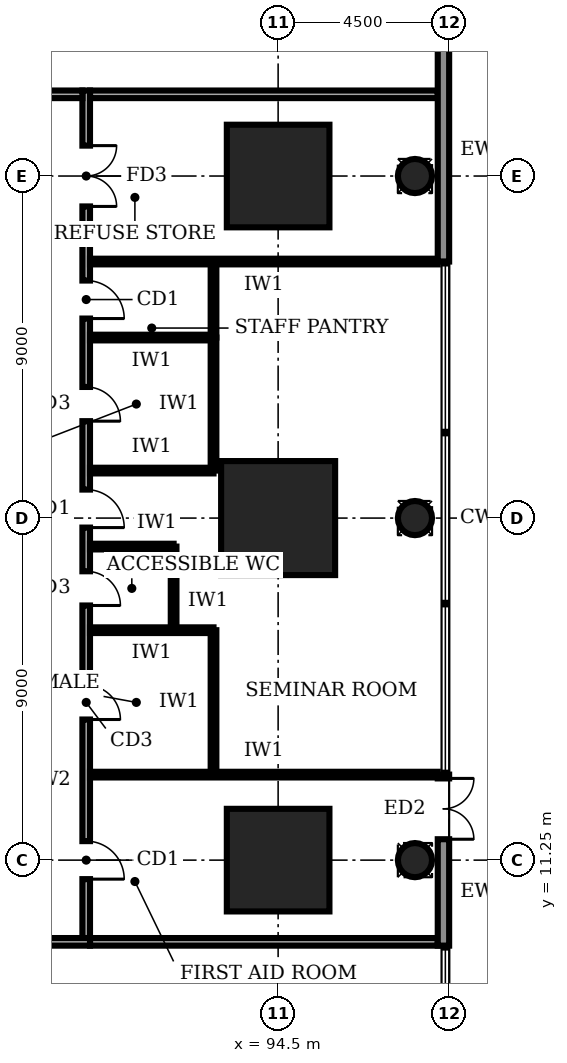
"""IFC4 building model, lengths in metres.
Left out: names, types, materials, properties, quantities, classifications, styles, units other than length and angle.
Written with IfcOpenShell. Run it as: python <this file> out.ifc"""

import sys

from ifc_helpers import new_model, si_unit, direction, frame, frame_2d, origin, origin_2d, place, context, subcontext, project, spatial, rectangle, circle, extrude, element, fill, save


model = new_model("IFC4")
c1 = context("Model", 3, precision=1e-05, world=origin(), true_north=direction((0.0, 1.0)))
c2 = subcontext(c1, "Body", "Model", "MODEL_VIEW")
j1 = project(units=[si_unit("LENGTHUNIT", "METRE"), si_unit("PLANEANGLEUNIT", "RADIAN")], contexts=[c1])
p1 = place(None, origin())
s1 = spatial("IfcSite", under=j1, at=p1, CompositionType="ELEMENT")
p2 = place(p1, origin())
s2 = spatial("IfcBuilding", under=s1, at=p2, CompositionType="ELEMENT")
p3 = place(p2, origin())
s3 = spatial("IfcBuildingStorey", under=s2, at=p3, CompositionType="ELEMENT", Elevation=0.0)
p4 = place(p3, frame((94.5, 11.25, -0.4), z_axis=(0.0, 0.0, 1.0), x_axis=(1.0, 0.0, 0.0)))
e1 = element("IfcColumn", 1, at=p4, inside=s3, PredefinedType="COLUMN", context=c2, shape_type="SweptSolid", body=[
    extrude(rectangle(XDim=2.7, YDim=2.7, at=origin_2d()), origin(), (0.0, 0.0, 1.0), 6.4),
])
p5 = place(p3, frame((94.5, 20.25, -0.4), z_axis=(0.0, 0.0, 1.0), x_axis=(1.0, 0.0, 0.0)))
e2 = element("IfcColumn", 2, at=p5, inside=s3, PredefinedType="COLUMN", context=c2, shape_type="SweptSolid", body=[
    extrude(rectangle(XDim=3.0, YDim=3.0, at=origin_2d()), origin(), (0.0, 0.0, 1.0), 6.4),
])
p6 = place(p3, frame((94.5, 29.25, -0.4), z_axis=(0.0, 0.0, 1.0), x_axis=(1.0, 0.0, 0.0)))
e3 = element("IfcColumn", 3, at=p6, inside=s3, PredefinedType="COLUMN", context=c2, shape_type="SweptSolid", body=[
    extrude(rectangle(XDim=2.7, YDim=2.7, at=origin_2d()), origin(), (0.0, 0.0, 1.0), 6.4),
])
for number, where, z_axis, x_axis in (
    (4, (98.1, 11.25, -0.4), (0.0, 0.0, 1.0), (1.0, 0.0, 0.0)),
    (5, (98.1, 20.25, -0.4), (0.0, 0.0, 1.0), (1.0, 0.0, 0.0)),
    (6, (98.1, 29.25, -0.4), (0.0, 0.0, 1.0), (1.0, 0.0, 0.0)),
):
    element("IfcColumn", number, at=place(p3, frame(where, z_axis=z_axis, x_axis=x_axis)), inside=s3, PredefinedType="COLUMN", context=c2, shape_type="SweptSolid", body=[
        extrude(circle(Radius=0.45, at=origin_2d()), origin(), (0.0, 0.0, 1.0), 6.4),
    ])
p7 = place(p3, frame((98.85, 9.0, 0.0), z_axis=(0.0, 0.0, 1.0), x_axis=(0.0, 1.0, 0.0)))
e7 = element("IfcWall", 7, at=p7, inside=s3, PredefinedType="STANDARD", context=c2, shape_type="SweptSolid", body=[
    extrude(rectangle(XDim=4.5, YDim=0.3, at=frame_2d((2.25, 0.0))), origin(), (0.0, 0.0, 1.0), 5.7),
])
p8 = place(p7, frame((2.8, 0.0, 0.0)))
e8 = element("IfcOpeningElement", 8, at=p8, cuts=e7, PredefinedType="OPENING", context=c2, shape_type="SweptSolid", body=[
    extrude(rectangle(XDim=1.6, YDim=2.4, at=frame_2d((0.8, 1.2))), frame((0.0, 0.16, 0.0), z_axis=(0.0, -1.0, 0.0), x_axis=(1.0, 0.0, 0.0)), (0.0, 0.0, 1.0), 0.32),
])
p9 = place(p3, frame((98.85, 27.0, 0.0), z_axis=(0.0, 0.0, 1.0), x_axis=(0.0, 1.0, 0.0)))
e9 = element("IfcWall", 9, at=p9, inside=s3, PredefinedType="STANDARD", context=c2, shape_type="SweptSolid", body=[
    extrude(rectangle(XDim=9.0, YDim=0.3, at=frame_2d((4.5, 0.0))), origin(), (0.0, 0.0, 1.0), 5.7),
])
p10 = place(p9, frame((5.85, 0.0, 0.0)))
e10 = element("IfcOpeningElement", 10, at=p10, cuts=e9, PredefinedType="OPENING", context=c2, shape_type="SweptSolid", body=[
    extrude(rectangle(XDim=1.8, YDim=2.4, at=frame_2d((0.9, 1.2))), frame((0.0, 0.16, 0.0), z_axis=(0.0, -1.0, 0.0), x_axis=(1.0, 0.0, 0.0)), (0.0, 0.0, 1.0), 0.32),
])
p11 = place(p3, frame((72.65, 9.1, 0.0), z_axis=(0.0, 0.0, 1.0), x_axis=(1.0, 0.0, 0.0)))
e11 = element("IfcWall", 11, at=p11, inside=s3, PredefinedType="SOLIDWALL", context=c2, shape_type="SweptSolid", body=[
    extrude(rectangle(XDim=16.9, YDim=0.2, at=frame_2d((8.45, 0.0))), origin(), (0.0, 0.0, 1.0), 5.7),
])
p12 = place(p11, frame((0.925, 0.0, 0.0)))
e12 = element("IfcOpeningElement", 12, at=p12, cuts=e11, PredefinedType="OPENING", context=c2, shape_type="SweptSolid", body=[
    extrude(rectangle(XDim=1.8, YDim=2.1, at=frame_2d((0.9, 1.05))), frame((0.0, 0.11, 0.0), z_axis=(0.0, -1.0, 0.0), x_axis=(1.0, 0.0, 0.0)), (0.0, 0.0, 1.0), 0.22),
])
p13 = place(p11, frame((7.45, 0.0, 0.0)))
e13 = element("IfcOpeningElement", 13, at=p13, cuts=e11, PredefinedType="OPENING", context=c2, shape_type="SweptSolid", body=[
    extrude(rectangle(XDim=1.8, YDim=2.1, at=frame_2d((0.9, 1.05))), frame((0.0, 0.11, 0.0), z_axis=(0.0, -1.0, 0.0), x_axis=(1.0, 0.0, 0.0)), (0.0, 0.0, 1.0), 0.22),
])
p14 = place(p11, frame((13.975, 0.0, 0.0)))
e14 = element("IfcOpeningElement", 14, at=p14, cuts=e11, PredefinedType="OPENING", context=c2, shape_type="SweptSolid", body=[
    extrude(rectangle(XDim=1.8, YDim=2.1, at=frame_2d((0.9, 1.05))), frame((0.0, 0.11, 0.0), z_axis=(0.0, -1.0, 0.0), x_axis=(1.0, 0.0, 0.0)), (0.0, 0.0, 1.0), 0.22),
])
p15 = place(p3, frame((89.45, 9.2, 0.0), z_axis=(0.0, 0.0, 1.0), x_axis=(0.0, 1.0, 0.0)))
e15 = element("IfcWall", 15, at=p15, inside=s3, PredefinedType="SOLIDWALL", context=c2, shape_type="SweptSolid", body=[
    extrude(rectangle(XDim=22.3, YDim=0.2, at=frame_2d((11.15, 0.0))), origin(), (0.0, 0.0, 1.0), 5.7),
])
p16 = place(p15, frame((1.55, 0.0, 0.0)))
e16 = element("IfcOpeningElement", 16, at=p16, cuts=e15, PredefinedType="OPENING", context=c2, shape_type="SweptSolid", body=[
    extrude(rectangle(XDim=1.0, YDim=2.1, at=frame_2d((0.5, 1.05))), frame((0.0, 0.11, 0.0), z_axis=(0.0, -1.0, 0.0), x_axis=(1.0, 0.0, 0.0)), (0.0, 0.0, 1.0), 0.22),
])
p17 = place(p15, frame((5.75, 0.0, 0.0)))
e17 = element("IfcOpeningElement", 17, at=p17, cuts=e15, PredefinedType="OPENING", context=c2, shape_type="SweptSolid", body=[
    extrude(rectangle(XDim=0.9, YDim=2.1, at=frame_2d((0.45, 1.05))), frame((0.0, 0.11, 0.0), z_axis=(0.0, -1.0, 0.0), x_axis=(1.0, 0.0, 0.0)), (0.0, 0.0, 1.0), 0.22),
])
p18 = place(p15, frame((8.75, 0.0, 0.0)))
e18 = element("IfcOpeningElement", 18, at=p18, cuts=e15, PredefinedType="OPENING", context=c2, shape_type="SweptSolid", body=[
    extrude(rectangle(XDim=0.9, YDim=2.1, at=frame_2d((0.45, 1.05))), frame((0.0, 0.11, 0.0), z_axis=(0.0, -1.0, 0.0), x_axis=(1.0, 0.0, 0.0)), (0.0, 0.0, 1.0), 0.22),
])
p19 = place(p15, frame((13.6, 0.0, 0.0)))
e19 = element("IfcOpeningElement", 19, at=p19, cuts=e15, PredefinedType="OPENING", context=c2, shape_type="SweptSolid", body=[
    extrude(rectangle(XDim=0.9, YDim=2.1, at=frame_2d((0.45, 1.05))), frame((0.0, 0.11, 0.0), z_axis=(0.0, -1.0, 0.0), x_axis=(1.0, 0.0, 0.0)), (0.0, 0.0, 1.0), 0.22),
])
p20 = place(p15, frame((16.3, 0.0, 0.0)))
e20 = element("IfcOpeningElement", 20, at=p20, cuts=e15, PredefinedType="OPENING", context=c2, shape_type="SweptSolid", body=[
    extrude(rectangle(XDim=1.0, YDim=2.1, at=frame_2d((0.5, 1.05))), frame((0.0, 0.11, 0.0), z_axis=(0.0, -1.0, 0.0), x_axis=(1.0, 0.0, 0.0)), (0.0, 0.0, 1.0), 0.22),
])
p21 = place(p15, frame((10.8, 0.0, 0.0)))
e21 = element("IfcOpeningElement", 21, at=p21, cuts=e15, PredefinedType="OPENING", context=c2, shape_type="SweptSolid", body=[
    extrude(rectangle(XDim=1.0, YDim=2.1, at=frame_2d((0.5, 1.05))), frame((0.0, 0.11, 0.0), z_axis=(0.0, -1.0, 0.0), x_axis=(1.0, 0.0, 0.0)), (0.0, 0.0, 1.0), 0.22),
])
p22 = place(p15, frame((19.25, 0.0, 0.0)))
e22 = element("IfcOpeningElement", 22, at=p22, cuts=e15, PredefinedType="OPENING", context=c2, shape_type="SweptSolid", body=[
    extrude(rectangle(XDim=1.6, YDim=2.1, at=frame_2d((0.8, 1.05))), frame((0.0, 0.11, 0.0), z_axis=(0.0, -1.0, 0.0), x_axis=(1.0, 0.0, 0.0)), (0.0, 0.0, 1.0), 0.22),
])
p23 = place(p3, frame((89.35, 31.4, 0.0), z_axis=(0.0, 0.0, 1.0), x_axis=(-1.0, 0.0, 0.0)))
e23 = element("IfcWall", 23, at=p23, inside=s3, PredefinedType="SOLIDWALL", context=c2, shape_type="SweptSolid", body=[
    extrude(rectangle(XDim=16.9, YDim=0.2, at=frame_2d((8.45, 0.0))), origin(), (0.0, 0.0, 1.0), 5.7),
])
p24 = place(p23, frame((13.975, 0.0, 0.0)))
e24 = element("IfcOpeningElement", 24, at=p24, cuts=e23, PredefinedType="OPENING", context=c2, shape_type="SweptSolid", body=[
    extrude(rectangle(XDim=1.8, YDim=2.1, at=frame_2d((0.9, 1.05))), frame((0.0, 0.11, 0.0), z_axis=(0.0, -1.0, 0.0), x_axis=(1.0, 0.0, 0.0)), (0.0, 0.0, 1.0), 0.22),
])
p25 = place(p23, frame((7.85, 0.0, 0.0)))
e25 = element("IfcOpeningElement", 25, at=p25, cuts=e23, PredefinedType="OPENING", context=c2, shape_type="SweptSolid", body=[
    extrude(rectangle(XDim=1.0, YDim=2.1, at=frame_2d((0.5, 1.05))), frame((0.0, 0.11, 0.0), z_axis=(0.0, -1.0, 0.0), x_axis=(1.0, 0.0, 0.0)), (0.0, 0.0, 1.0), 0.22),
])
p26 = place(p23, frame((0.925, 0.0, 0.0)))
e26 = element("IfcOpeningElement", 26, at=p26, cuts=e23, PredefinedType="OPENING", context=c2, shape_type="SweptSolid", body=[
    extrude(rectangle(XDim=1.8, YDim=2.1, at=frame_2d((0.9, 1.05))), frame((0.0, 0.11, 0.0), z_axis=(0.0, -1.0, 0.0), x_axis=(1.0, 0.0, 0.0)), (0.0, 0.0, 1.0), 0.22),
])
for number, where, z_axis, x_axis in (
    (27, (89.55, 9.1, 0.0), (0.0, 0.0, 1.0), (1.0, 0.0, 0.0)),
    (28, (89.55, 31.4, 0.0), (0.0, 0.0, 1.0), (1.0, 0.0, 0.0)),
):
    element("IfcWall", number, at=place(p3, frame(where, z_axis=z_axis, x_axis=x_axis)), inside=s3, PredefinedType="SOLIDWALL", context=c2, shape_type="SweptSolid", body=[
        extrude(rectangle(XDim=9.15, YDim=0.2, at=frame_2d((4.575, 0.0))), origin(), (0.0, 0.0, 1.0), 5.7),
    ])
for number, where, z_axis, x_axis in (
    (29, (89.55, 13.5, 0.0), (0.0, 0.0, 1.0), (1.0, 0.0, 0.0)),
    (30, (89.55, 27.0, 0.0), (0.0, 0.0, 1.0), (1.0, 0.0, 0.0)),
):
    element("IfcWall", number, at=place(p3, frame(where, z_axis=z_axis, x_axis=x_axis)), inside=s3, PredefinedType="PARTITIONING", context=c2, shape_type="SweptSolid", body=[
        extrude(rectangle(XDim=9.15, YDim=0.15, at=frame_2d((4.575, 0.0))), origin(), (0.0, 0.0, 1.0), 5.7),
    ])
p27 = place(p3, frame((89.55, 17.3, 0.0), z_axis=(0.0, 0.0, 1.0), x_axis=(1.0, 0.0, 0.0)))
e31 = element("IfcWall", 31, at=p27, inside=s3, PredefinedType="PARTITIONING", context=c2, shape_type="SweptSolid", body=[
    extrude(rectangle(XDim=3.25, YDim=0.15, at=frame_2d((1.625, 0.0))), origin(), (0.0, 0.0, 1.0), 5.7),
])
p28 = place(p3, frame((89.55, 19.5, 0.0), z_axis=(0.0, 0.0, 1.0), x_axis=(1.0, 0.0, 0.0)))
e32 = element("IfcWall", 32, at=p28, inside=s3, PredefinedType="PARTITIONING", context=c2, shape_type="SweptSolid", body=[
    extrude(rectangle(XDim=2.2, YDim=0.15, at=frame_2d((1.1, 0.0))), origin(), (0.0, 0.0, 1.0), 5.7),
])
for number, where, z_axis, x_axis in (
    (33, (89.55, 21.5, 0.0), (0.0, 0.0, 1.0), (1.0, 0.0, 0.0)),
    (34, (89.55, 25.0, 0.0), (0.0, 0.0, 1.0), (1.0, 0.0, 0.0)),
):
    element("IfcWall", number, at=place(p3, frame(where, z_axis=z_axis, x_axis=x_axis)), inside=s3, PredefinedType="PARTITIONING", context=c2, shape_type="SweptSolid", body=[
        extrude(rectangle(XDim=3.25, YDim=0.15, at=frame_2d((1.625, 0.0))), origin(), (0.0, 0.0, 1.0), 5.7),
    ])
p29 = place(p3, frame((92.8, 13.5, 0.0), z_axis=(0.0, 0.0, 1.0), x_axis=(0.0, 1.0, 0.0)))
e35 = element("IfcWall", 35, at=p29, inside=s3, PredefinedType="PARTITIONING", context=c2, shape_type="SweptSolid", body=[
    extrude(rectangle(XDim=3.8, YDim=0.15, at=frame_2d((1.9, 0.0))), origin(), (0.0, 0.0, 1.0), 5.7),
])
p30 = place(p3, frame((91.75, 17.3, 0.0), z_axis=(0.0, 0.0, 1.0), x_axis=(0.0, 1.0, 0.0)))
e36 = element("IfcWall", 36, at=p30, inside=s3, PredefinedType="PARTITIONING", context=c2, shape_type="SweptSolid", body=[
    extrude(rectangle(XDim=2.2, YDim=0.15, at=frame_2d((1.1, 0.0))), origin(), (0.0, 0.0, 1.0), 5.7),
])
p31 = place(p3, frame((92.8, 21.5, 0.0), z_axis=(0.0, 0.0, 1.0), x_axis=(0.0, 1.0, 0.0)))
e37 = element("IfcWall", 37, at=p31, inside=s3, PredefinedType="PARTITIONING", context=c2, shape_type="SweptSolid", body=[
    extrude(rectangle(XDim=3.5, YDim=0.15, at=frame_2d((1.75, 0.0))), origin(), (0.0, 0.0, 1.0), 5.7),
])
p32 = place(p3, frame((92.8, 25.0, 0.0), z_axis=(0.0, 0.0, 1.0), x_axis=(0.0, 1.0, 0.0)))
e38 = element("IfcWall", 38, at=p32, inside=s3, PredefinedType="PARTITIONING", context=c2, shape_type="SweptSolid", body=[
    extrude(rectangle(XDim=2.0, YDim=0.15, at=frame_2d((1.0, 0.0))), origin(), (0.0, 0.0, 1.0), 5.7),
])
p33 = place(p8, frame((1.6, 0.0, 0.0), z_axis=(0.0, 0.0, 1.0), x_axis=(-1.0, 0.0, 0.0)))
e39 = element("IfcDoor", 39, at=p33, inside=s3, OperationType="DOUBLE_DOOR_SINGLE_SWING", PredefinedType="DOOR", context=c2, shape_type="SweptSolid", body=[
    extrude(rectangle(XDim=1.6, YDim=2.4, at=frame_2d((0.8, 1.2))), frame((0.0, 0.025, 0.0), z_axis=(0.0, -1.0, 0.0), x_axis=(1.0, 0.0, 0.0)), (0.0, 0.0, 1.0), 0.05),
])
fill(e8, e39)
p34 = place(p16, frame((1.0, 0.0, 0.0), z_axis=(0.0, 0.0, 1.0), x_axis=(-1.0, 0.0, 0.0)))
e40 = element("IfcDoor", 40, at=p34, inside=s3, OperationType="SINGLE_SWING_RIGHT", PredefinedType="DOOR", context=c2, shape_type="SweptSolid", body=[
    extrude(rectangle(XDim=1.0, YDim=2.1, at=frame_2d((0.5, 1.05))), frame((0.0, 0.025, 0.0), z_axis=(0.0, -1.0, 0.0), x_axis=(1.0, 0.0, 0.0)), (0.0, 0.0, 1.0), 0.05),
])
fill(e16, e40)
p35 = place(p17, frame((0.9, 0.0, 0.0), z_axis=(0.0, 0.0, 1.0), x_axis=(-1.0, 0.0, 0.0)))
e41 = element("IfcDoor", 41, at=p35, inside=s3, OperationType="SINGLE_SWING_RIGHT", PredefinedType="DOOR", context=c2, shape_type="SweptSolid", body=[
    extrude(rectangle(XDim=0.9, YDim=2.1, at=frame_2d((0.45, 1.05))), frame((0.0, 0.025, 0.0), z_axis=(0.0, -1.0, 0.0), x_axis=(1.0, 0.0, 0.0)), (0.0, 0.0, 1.0), 0.05),
])
fill(e17, e41)
p36 = place(p18, frame((0.9, 0.0, 0.0), z_axis=(0.0, 0.0, 1.0), x_axis=(-1.0, 0.0, 0.0)))
e42 = element("IfcDoor", 42, at=p36, inside=s3, OperationType="SINGLE_SWING_RIGHT", PredefinedType="DOOR", context=c2, shape_type="SweptSolid", body=[
    extrude(rectangle(XDim=0.9, YDim=2.1, at=frame_2d((0.45, 1.05))), frame((0.0, 0.025, 0.0), z_axis=(0.0, -1.0, 0.0), x_axis=(1.0, 0.0, 0.0)), (0.0, 0.0, 1.0), 0.05),
])
fill(e18, e42)
p37 = place(p19, frame((0.9, 0.0, 0.0), z_axis=(0.0, 0.0, 1.0), x_axis=(-1.0, 0.0, 0.0)))
e43 = element("IfcDoor", 43, at=p37, inside=s3, OperationType="SINGLE_SWING_RIGHT", PredefinedType="DOOR", context=c2, shape_type="SweptSolid", body=[
    extrude(rectangle(XDim=0.9, YDim=2.1, at=frame_2d((0.45, 1.05))), frame((0.0, 0.025, 0.0), z_axis=(0.0, -1.0, 0.0), x_axis=(1.0, 0.0, 0.0)), (0.0, 0.0, 1.0), 0.05),
])
fill(e19, e43)
p38 = place(p20, frame((1.0, 0.0, 0.0), z_axis=(0.0, 0.0, 1.0), x_axis=(-1.0, 0.0, 0.0)))
e44 = element("IfcDoor", 44, at=p38, inside=s3, OperationType="SINGLE_SWING_RIGHT", PredefinedType="DOOR", context=c2, shape_type="SweptSolid", body=[
    extrude(rectangle(XDim=1.0, YDim=2.1, at=frame_2d((0.5, 1.05))), frame((0.0, 0.025, 0.0), z_axis=(0.0, -1.0, 0.0), x_axis=(1.0, 0.0, 0.0)), (0.0, 0.0, 1.0), 0.05),
])
fill(e20, e44)
p39 = place(p21, frame((1.0, 0.0, 0.0), z_axis=(0.0, 0.0, 1.0), x_axis=(-1.0, 0.0, 0.0)))
e45 = element("IfcDoor", 45, at=p39, inside=s3, OperationType="SINGLE_SWING_RIGHT", PredefinedType="DOOR", context=c2, shape_type="SweptSolid", body=[
    extrude(rectangle(XDim=1.0, YDim=2.1, at=frame_2d((0.5, 1.05))), frame((0.0, 0.025, 0.0), z_axis=(0.0, -1.0, 0.0), x_axis=(1.0, 0.0, 0.0)), (0.0, 0.0, 1.0), 0.05),
])
fill(e21, e45)
p40 = place(p22, frame((1.6, 0.0, 0.0), z_axis=(0.0, 0.0, 1.0), x_axis=(-1.0, 0.0, 0.0)))
e46 = element("IfcDoor", 46, at=p40, inside=s3, OperationType="DOUBLE_DOOR_SINGLE_SWING", PredefinedType="DOOR", context=c2, shape_type="SweptSolid", body=[
    extrude(rectangle(XDim=1.6, YDim=2.1, at=frame_2d((0.8, 1.05))), frame((0.0, 0.025, 0.0), z_axis=(0.0, -1.0, 0.0), x_axis=(1.0, 0.0, 0.0)), (0.0, 0.0, 1.0), 0.05),
])
fill(e22, e46)
save(model, sys.argv[1])
